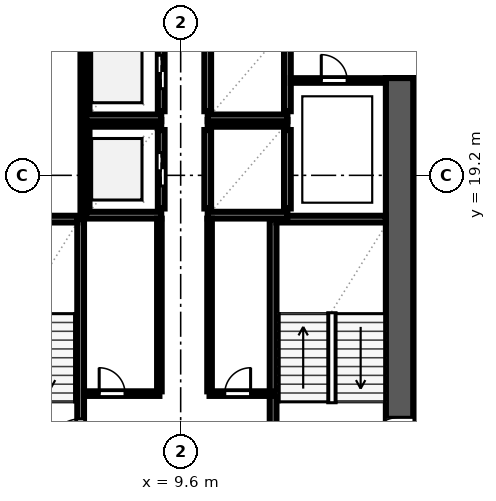
"""IFC4 building model, lengths in metres.
Left out: names, types, materials, properties, quantities, classifications, styles, units other than length and angle.
Written with IfcOpenShell. Run it as: python <this file> out.ifc"""

import sys

from ifc_helpers import new_model, si_unit, direction, frame, frame_2d, origin, place, context, subcontext, project, spatial, rectangle, extrude, element, fill, save


model = new_model("IFC4")
c1 = context("Model", 3, precision=1e-05, world=origin(), true_north=direction((0.0, 1.0)))
c2 = subcontext(c1, "Body", "Model", "MODEL_VIEW")
j1 = project(units=[si_unit("LENGTHUNIT", "METRE"), si_unit("PLANEANGLEUNIT", "RADIAN")], contexts=[c1])
p1 = place(None, origin())
s1 = spatial("IfcSite", under=j1, at=p1, CompositionType="ELEMENT")
p2 = place(p1, origin())
s2 = spatial("IfcBuilding", under=s1, at=p2, CompositionType="ELEMENT")
p3 = place(p2, frame((0.0, 0.0, 73.6)))
s3 = spatial("IfcBuildingStorey", under=s2, at=p3, CompositionType="ELEMENT", Elevation=73.6)
p4 = place(p3, frame((16.8, 10.05, 0.0), z_axis=(0.0, 0.0, 1.0), x_axis=(0.0, 1.0, 0.0)))
e1 = element("IfcWall", 1, at=p4, inside=s3, PredefinedType="SHEAR", context=c2, shape_type="SweptSolid", body=[
    extrude(rectangle(XDim=12.35, YDim=0.9, at=frame_2d((6.175, 0.0))), origin(), (0.0, 0.0, 1.0), 3.54),
])
p5 = place(p4, frame((0.09, 0.0, 0.0)))
e2 = element("IfcOpeningElement", 2, at=p5, cuts=e1, PredefinedType="OPENING", context=c2, shape_type="SweptSolid", body=[
    extrude(rectangle(XDim=1.1, YDim=2.2, at=frame_2d((0.55, 1.1))), frame((0.0, 0.462, 0.0), z_axis=(0.0, -1.0, 0.0), x_axis=(1.0, 0.0, 0.0)), (0.0, 0.0, 1.0), 0.924),
])
p6 = place(p3, frame((6.31, 9.95, 0.0), z_axis=(0.0, 0.0, 1.0), x_axis=(0.0, 1.0, 0.0)))
e3 = element("IfcWall", 3, at=p6, inside=s3, PredefinedType="SOLIDWALL", context=c2, shape_type="SweptSolid", body=[
    extrude(rectangle(XDim=7.81, YDim=0.22, at=frame_2d((3.905, 0.0))), origin(), (0.0, 0.0, 1.0), 3.54),
])
p7 = place(p6, frame((0.14, 0.0, 0.0)))
e4 = element("IfcOpeningElement", 4, at=p7, cuts=e3, PredefinedType="OPENING", context=c2, shape_type="SweptSolid", body=[
    extrude(rectangle(XDim=1.1, YDim=2.2, at=frame_2d((0.55, 1.1))), frame((0.0, 0.122, 0.0), z_axis=(0.0, -1.0, 0.0), x_axis=(1.0, 0.0, 0.0)), (0.0, 0.0, 1.0), 0.244),
])
p8 = place(p3, frame((2.65, 17.76, 0.0), z_axis=(0.0, 0.0, 1.0), x_axis=(1.0, 0.0, 0.0)))
e5 = element("IfcWall", 5, at=p8, inside=s3, PredefinedType="SOLIDWALL", context=c2, shape_type="SweptSolid", body=[
    extrude(rectangle(XDim=3.55, YDim=0.22, at=frame_2d((1.775, 0.0))), origin(), (0.0, 0.0, 1.0), 3.54),
])
p9 = place(p3, frame((12.64, 10.05, 0.0), z_axis=(0.0, 0.0, 1.0), x_axis=(0.0, 1.0, 0.0)))
e6 = element("IfcWall", 6, at=p9, inside=s3, PredefinedType="SOLIDWALL", context=c2, shape_type="SweptSolid", body=[
    extrude(rectangle(XDim=7.71, YDim=0.22, at=frame_2d((3.855, 0.0))), origin(), (0.0, 0.0, 1.0), 3.54),
])
p10 = place(p3, frame((12.75, 17.76, 0.0), z_axis=(0.0, 0.0, 1.0), x_axis=(1.0, 0.0, 0.0)))
e7 = element("IfcWall", 7, at=p10, inside=s3, PredefinedType="SOLIDWALL", context=c2, shape_type="SweptSolid", body=[
    extrude(rectangle(XDim=3.6, YDim=0.22, at=frame_2d((1.8, 0.0))), origin(), (0.0, 0.0, 1.0), 3.54),
])
p11 = place(p3, frame((6.49, 18.11, 0.0), z_axis=(0.0, 0.0, 1.0), x_axis=(0.0, 1.0, 0.0)))
e8 = element("IfcWall", 8, at=p11, inside=s3, PredefinedType="SOLIDWALL", context=c2, shape_type="SweptSolid", body=[
    extrude(rectangle(XDim=2.58, YDim=0.22, at=frame_2d((1.29, 0.0))), origin(), (0.0, 0.0, 1.0), 3.54),
])
p12 = place(p3, frame((8.96, 18.11, 0.0), z_axis=(0.0, 0.0, 1.0), x_axis=(0.0, 1.0, 0.0)))
e9 = element("IfcWall", 9, at=p12, inside=s3, PredefinedType="SOLIDWALL", context=c2, shape_type="SweptSolid", body=[
    extrude(rectangle(XDim=2.58, YDim=0.22, at=frame_2d((1.29, 0.0))), origin(), (0.0, 0.0, 1.0), 3.54),
])
p13 = place(p12, frame((0.74, 0.0, 0.0)))
e10 = element("IfcOpeningElement", 10, at=p13, cuts=e9, PredefinedType="OPENING", context=c2, shape_type="SweptSolid", body=[
    extrude(rectangle(XDim=1.1, YDim=2.2, at=frame_2d((0.55, 1.1))), frame((0.0, 0.122, 0.0), z_axis=(0.0, -1.0, 0.0), x_axis=(1.0, 0.0, 0.0)), (0.0, 0.0, 1.0), 0.244),
])
for number, where, z_axis, x_axis in (
    (11, (6.49, 17.89, 0.0), (0.0, 0.0, 1.0), (1.0, 0.0, 0.0)),
    (12, (6.49, 20.91, 0.0), (0.0, 0.0, 1.0), (1.0, 0.0, 0.0)),
):
    element("IfcWall", number, at=place(p3, frame(where, z_axis=z_axis, x_axis=x_axis)), inside=s3, PredefinedType="SOLIDWALL", context=c2, shape_type="SweptSolid", body=[
        extrude(rectangle(XDim=2.47, YDim=0.22, at=frame_2d((1.235, 0.0))), origin(), (0.0, 0.0, 1.0), 3.54),
    ])
p14 = place(p3, frame((6.49, 21.31, 0.0), z_axis=(0.0, 0.0, 1.0), x_axis=(0.0, 1.0, 0.0)))
e13 = element("IfcWall", 13, at=p14, inside=s3, PredefinedType="SOLIDWALL", context=c2, shape_type="SweptSolid", body=[
    extrude(rectangle(XDim=2.58, YDim=0.22, at=frame_2d((1.29, 0.0))), origin(), (0.0, 0.0, 1.0), 3.54),
])
p15 = place(p3, frame((8.96, 21.31, 0.0), z_axis=(0.0, 0.0, 1.0), x_axis=(0.0, 1.0, 0.0)))
e14 = element("IfcWall", 14, at=p15, inside=s3, PredefinedType="SOLIDWALL", context=c2, shape_type="SweptSolid", body=[
    extrude(rectangle(XDim=2.58, YDim=0.22, at=frame_2d((1.29, 0.0))), origin(), (0.0, 0.0, 1.0), 3.54),
])
p16 = place(p15, frame((0.74, 0.0, 0.0)))
e15 = element("IfcOpeningElement", 15, at=p16, cuts=e14, PredefinedType="OPENING", context=c2, shape_type="SweptSolid", body=[
    extrude(rectangle(XDim=1.1, YDim=2.2, at=frame_2d((0.55, 1.1))), frame((0.0, 0.122, 0.0), z_axis=(0.0, -1.0, 0.0), x_axis=(1.0, 0.0, 0.0)), (0.0, 0.0, 1.0), 0.244),
])
p17 = place(p3, frame((6.49, 21.09, 0.0), z_axis=(0.0, 0.0, 1.0), x_axis=(1.0, 0.0, 0.0)))
e16 = element("IfcWall", 16, at=p17, inside=s3, PredefinedType="SOLIDWALL", context=c2, shape_type="SweptSolid", body=[
    extrude(rectangle(XDim=2.47, YDim=0.22, at=frame_2d((1.235, 0.0))), origin(), (0.0, 0.0, 1.0), 3.54),
])
for number, where, z_axis, x_axis in (
    (17, (10.49, 18.11, 0.0), (0.0, 0.0, 1.0), (0.0, 1.0, 0.0)),
    (18, (13.11, 18.11, 0.0), (0.0, 0.0, 1.0), (0.0, 1.0, 0.0)),
):
    element("IfcWall", number, at=place(p3, frame(where, z_axis=z_axis, x_axis=x_axis)), inside=s3, PredefinedType="SOLIDWALL", context=c2, shape_type="SweptSolid", body=[
        extrude(rectangle(XDim=2.58, YDim=0.22, at=frame_2d((1.29, 0.0))), origin(), (0.0, 0.0, 1.0), 3.54),
    ])
for number, where, z_axis, x_axis in (
    (19, (10.49, 17.89, 0.0), (0.0, 0.0, 1.0), (1.0, 0.0, 0.0)),
    (20, (10.49, 20.91, 0.0), (0.0, 0.0, 1.0), (1.0, 0.0, 0.0)),
):
    element("IfcWall", number, at=place(p3, frame(where, z_axis=z_axis, x_axis=x_axis)), inside=s3, PredefinedType="SOLIDWALL", context=c2, shape_type="SweptSolid", body=[
        extrude(rectangle(XDim=2.62, YDim=0.22, at=frame_2d((1.31, 0.0))), origin(), (0.0, 0.0, 1.0), 3.54),
    ])
for number, where, z_axis, x_axis in (
    (21, (10.49, 21.31, 0.0), (0.0, 0.0, 1.0), (0.0, 1.0, 0.0)),
    (22, (13.11, 21.31, 0.0), (0.0, 0.0, 1.0), (0.0, 1.0, 0.0)),
):
    element("IfcWall", number, at=place(p3, frame(where, z_axis=z_axis, x_axis=x_axis)), inside=s3, PredefinedType="SOLIDWALL", context=c2, shape_type="SweptSolid", body=[
        extrude(rectangle(XDim=2.58, YDim=0.22, at=frame_2d((1.29, 0.0))), origin(), (0.0, 0.0, 1.0), 3.54),
    ])
p18 = place(p3, frame((10.49, 21.09, 0.0), z_axis=(0.0, 0.0, 1.0), x_axis=(1.0, 0.0, 0.0)))
e23 = element("IfcWall", 23, at=p18, inside=s3, PredefinedType="SOLIDWALL", context=c2, shape_type="SweptSolid", body=[
    extrude(rectangle(XDim=2.62, YDim=0.22, at=frame_2d((1.31, 0.0))), origin(), (0.0, 0.0, 1.0), 3.54),
])
p19 = place(p3, frame((6.42, 12.02, 0.0), z_axis=(0.0, 0.0, 1.0), x_axis=(1.0, 0.0, 0.0)))
e24 = element("IfcWall", 24, at=p19, inside=s3, PredefinedType="PARTITIONING", context=c2, shape_type="SweptSolid", body=[
    extrude(rectangle(XDim=2.48, YDim=0.15, at=frame_2d((1.24, 0.0))), origin(), (0.0, 0.0, 1.0), 3.54),
])
p20 = place(p19, frame((0.5, 0.0, 0.0)))
e25 = element("IfcOpeningElement", 25, at=p20, cuts=e24, PredefinedType="OPENING", context=c2, shape_type="SweptSolid", body=[
    extrude(rectangle(XDim=0.85, YDim=2.1, at=frame_2d((0.425, 1.05))), frame((0.0, 0.087, 0.0), z_axis=(0.0, -1.0, 0.0), x_axis=(1.0, 0.0, 0.0)), (0.0, 0.0, 1.0), 0.174),
])
p21 = place(p3, frame((10.55, 12.02, 0.0), z_axis=(0.0, 0.0, 1.0), x_axis=(1.0, 0.0, 0.0)))
e26 = element("IfcWall", 26, at=p21, inside=s3, PredefinedType="PARTITIONING", context=c2, shape_type="SweptSolid", body=[
    extrude(rectangle(XDim=2.08, YDim=0.15, at=frame_2d((1.04, 0.0))), origin(), (0.0, 0.0, 1.0), 3.54),
])
p22 = place(p21, frame((0.5, 0.0, 0.0)))
e27 = element("IfcOpeningElement", 27, at=p22, cuts=e26, PredefinedType="OPENING", context=c2, shape_type="SweptSolid", body=[
    extrude(rectangle(XDim=0.85, YDim=2.1, at=frame_2d((0.425, 1.05))), frame((0.0, 0.087, 0.0), z_axis=(0.0, -1.0, 0.0), x_axis=(1.0, 0.0, 0.0)), (0.0, 0.0, 1.0), 0.174),
])
for number, where, z_axis, x_axis in (
    (28, (8.9, 12.095, 0.0), (0.0, 0.0, 1.0), (0.0, 1.0, 0.0)),
    (29, (10.55, 12.095, 0.0), (0.0, 0.0, 1.0), (0.0, 1.0, 0.0)),
):
    element("IfcWall", number, at=place(p3, frame(where, z_axis=z_axis, x_axis=x_axis)), inside=s3, PredefinedType="PARTITIONING", context=c2, shape_type="SweptSolid", body=[
        extrude(rectangle(XDim=5.68, YDim=0.15, at=frame_2d((2.84, 0.0))), origin(), (0.0, 0.0, 1.0), 3.54),
    ])
p23 = place(p3, frame((13.225, 22.32, 0.0), z_axis=(0.0, 0.0, 1.0), x_axis=(1.0, 0.0, 0.0)))
e30 = element("IfcWall", 30, at=p23, inside=s3, PredefinedType="PARTITIONING", context=c2, shape_type="SweptSolid", body=[
    extrude(rectangle(XDim=3.12, YDim=0.15, at=frame_2d((1.56, 0.0))), origin(), (0.0, 0.0, 1.0), 3.54),
])
p24 = place(p23, frame((1.0, 0.0, 0.0)))
e31 = element("IfcOpeningElement", 31, at=p24, cuts=e30, PredefinedType="OPENING", context=c2, shape_type="SweptSolid", body=[
    extrude(rectangle(XDim=0.85, YDim=2.1, at=frame_2d((0.425, 1.05))), frame((0.0, 0.087, 0.0), z_axis=(0.0, -1.0, 0.0), x_axis=(1.0, 0.0, 0.0)), (0.0, 0.0, 1.0), 0.174),
])
p25 = place(p3, frame((6.38, 17.8, 0.0), z_axis=(0.0, 0.0, 1.0), x_axis=(0.0, 1.0, 0.0)))
e32 = element("IfcWall", 32, at=p25, inside=s3, PredefinedType="PARTITIONING", context=c2, shape_type="SweptSolid", body=[
    extrude(rectangle(XDim=18.98, YDim=0.15, at=frame_2d((9.49, 0.0))), origin(), (0.0, 0.0, 1.0), 3.54),
])
p26 = place(p25, frame((14.3, 0.0, 0.0)))
e33 = element("IfcOpeningElement", 33, at=p26, cuts=e32, PredefinedType="OPENING", context=c2, shape_type="SweptSolid", body=[
    extrude(rectangle(XDim=0.85, YDim=2.1, at=frame_2d((0.425, 1.05))), frame((0.0, 0.087, 0.0), z_axis=(0.0, -1.0, 0.0), x_axis=(1.0, 0.0, 0.0)), (0.0, 0.0, 1.0), 0.174),
])
p27 = place(p7, origin())
e34 = element("IfcDoor", 34, at=p27, inside=s3, OperationType="SINGLE_SWING_LEFT", PredefinedType="DOOR", context=c2, shape_type="SweptSolid", body=[
    extrude(rectangle(XDim=1.1, YDim=2.2, at=frame_2d((0.55, 1.1))), frame((0.0, 0.025, 0.0), z_axis=(0.0, -1.0, 0.0), x_axis=(1.0, 0.0, 0.0)), (0.0, 0.0, 1.0), 0.05),
])
fill(e4, e34)
p28 = place(p5, origin())
e35 = element("IfcDoor", 35, at=p28, inside=s3, OperationType="SINGLE_SWING_LEFT", PredefinedType="DOOR", context=c2, shape_type="SweptSolid", body=[
    extrude(rectangle(XDim=1.1, YDim=2.2, at=frame_2d((0.55, 1.1))), frame((0.0, 0.025, 0.0), z_axis=(0.0, -1.0, 0.0), x_axis=(1.0, 0.0, 0.0)), (0.0, 0.0, 1.0), 0.05),
])
fill(e2, e35)
p29 = place(p13, origin())
e36 = element("IfcDoor", 36, at=p29, inside=s3, OperationType="DOUBLE_DOOR_SLIDING", PredefinedType="DOOR", context=c2, shape_type="SweptSolid", body=[
    extrude(rectangle(XDim=1.1, YDim=2.2, at=frame_2d((0.55, 1.1))), frame((0.0, 0.025, 0.0), z_axis=(0.0, -1.0, 0.0), x_axis=(1.0, 0.0, 0.0)), (0.0, 0.0, 1.0), 0.05),
])
fill(e10, e36)
p30 = place(p16, origin())
e37 = element("IfcDoor", 37, at=p30, inside=s3, OperationType="DOUBLE_DOOR_SLIDING", PredefinedType="DOOR", context=c2, shape_type="SweptSolid", body=[
    extrude(rectangle(XDim=1.1, YDim=2.2, at=frame_2d((0.55, 1.1))), frame((0.0, 0.025, 0.0), z_axis=(0.0, -1.0, 0.0), x_axis=(1.0, 0.0, 0.0)), (0.0, 0.0, 1.0), 0.05),
])
fill(e15, e37)
p31 = place(p20, origin())
e38 = element("IfcDoor", 38, at=p31, inside=s3, OperationType="SINGLE_SWING_LEFT", PredefinedType="DOOR", context=c2, shape_type="SweptSolid", body=[
    extrude(rectangle(XDim=0.85, YDim=2.1, at=frame_2d((0.425, 1.05))), frame((0.0, 0.025, 0.0), z_axis=(0.0, -1.0, 0.0), x_axis=(1.0, 0.0, 0.0)), (0.0, 0.0, 1.0), 0.05),
])
fill(e25, e38)
p32 = place(p22, origin())
e39 = element("IfcDoor", 39, at=p32, inside=s3, OperationType="SINGLE_SWING_RIGHT", PredefinedType="DOOR", context=c2, shape_type="SweptSolid", body=[
    extrude(rectangle(XDim=0.85, YDim=2.1, at=frame_2d((0.425, 1.05))), frame((0.0, 0.025, 0.0), z_axis=(0.0, -1.0, 0.0), x_axis=(1.0, 0.0, 0.0)), (0.0, 0.0, 1.0), 0.05),
])
fill(e27, e39)
p33 = place(p24, origin())
e40 = element("IfcDoor", 40, at=p33, inside=s3, OperationType="SINGLE_SWING_LEFT", PredefinedType="DOOR", context=c2, shape_type="SweptSolid", body=[
    extrude(rectangle(XDim=0.85, YDim=2.1, at=frame_2d((0.425, 1.05))), frame((0.0, 0.025, 0.0), z_axis=(0.0, -1.0, 0.0), x_axis=(1.0, 0.0, 0.0)), (0.0, 0.0, 1.0), 0.05),
])
fill(e31, e40)
save(model, sys.argv[1])
